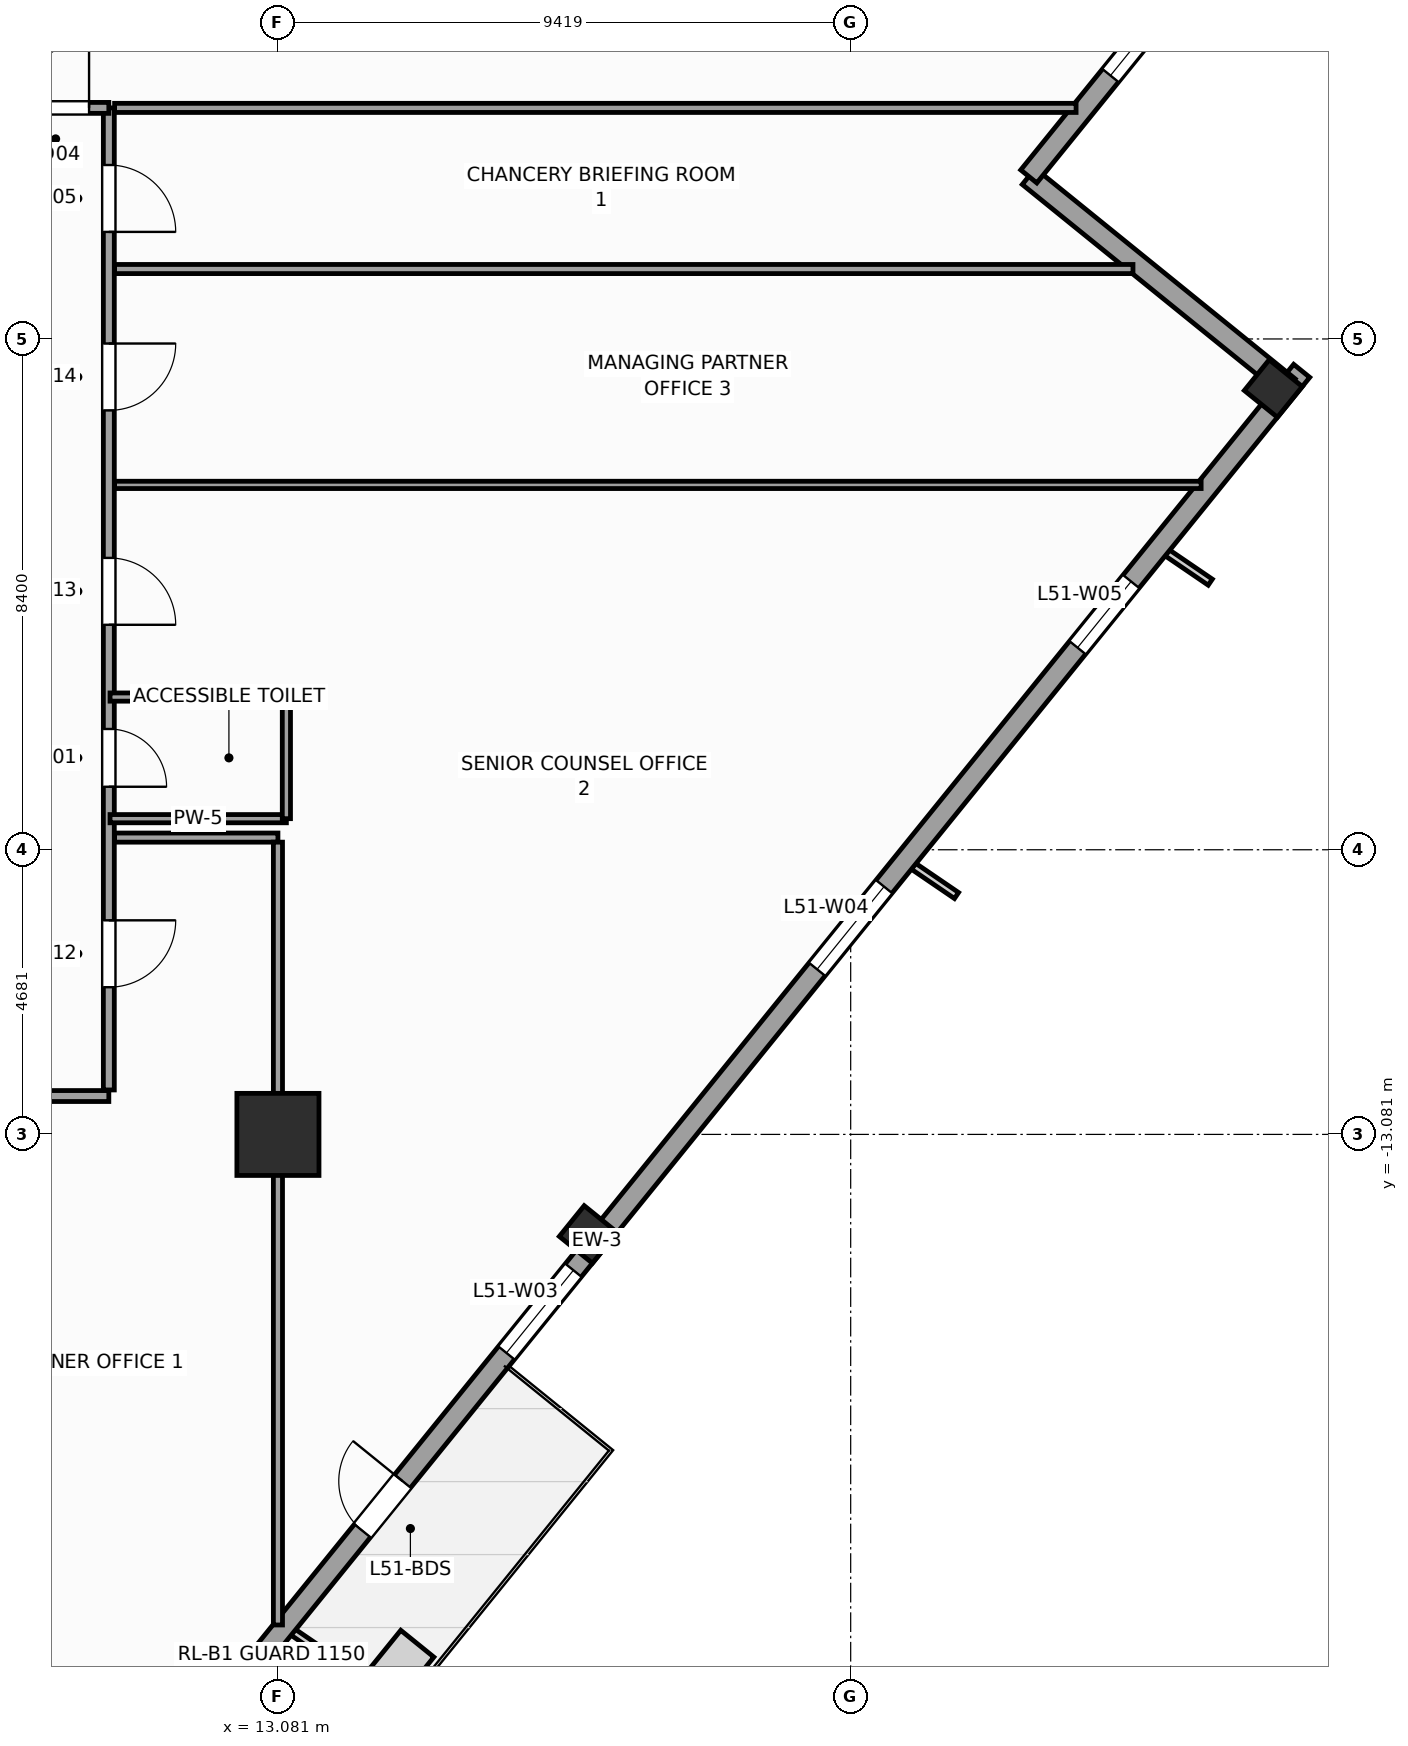
"""IFC4 building model, lengths in metres.
Left out: names, types, materials, properties, quantities, classifications, styles, units other than length and angle.
Written with IfcOpenShell. Run it as: python <this file> out.ifc"""

import sys

from ifc_helpers import new_model, si_unit, direction, frame, frame_2d, origin, origin_2d, place, context, subcontext, project, spatial, rectangle, extrude, source, transform, mapped, element, fill, save


model = new_model("IFC4")
c1 = context("Model", 3, precision=1e-05, world=origin(), true_north=direction((0.0, 1.0)))
c2 = subcontext(c1, "Body", "Model", "MODEL_VIEW")
j1 = project(units=[si_unit("LENGTHUNIT", "METRE"), si_unit("PLANEANGLEUNIT", "RADIAN")], contexts=[c1])
p1 = place(None, origin())
s1 = spatial("IfcSite", under=j1, at=p1, CompositionType="ELEMENT")
p2 = place(p1, origin())
s2 = spatial("IfcBuilding", under=s1, at=p2, CompositionType="ELEMENT")
p3 = place(p2, frame((0.0, 0.0, 213.4)))
s3 = spatial("IfcBuildingStorey", under=s2, at=p3, CompositionType="ELEMENT", Elevation=213.4)
m1 = source(origin(), c2, "Body", "SweptSolid", [
    extrude(rectangle(XDim=1.35, YDim=1.35, at=origin_2d()), origin(), (0.0, 0.0, 1.0), 3.9),
])
p4 = place(p3, frame((13.081, -13.081, 0.0), z_axis=(0.0, 0.0, 1.0), x_axis=(1.0, 0.0, 0.0)))
e1 = element("IfcColumn", 1, at=p4, inside=s3, PredefinedType="COLUMN", context=c2, shape_type="MappedRepresentation", body=[
    mapped(m1, transform((0.0, 0.0, 0.0), scale=1.0)),
])
m2 = source(origin(), c2, "Body", "SweptSolid", [
    extrude(rectangle(XDim=0.65, YDim=0.7, at=origin_2d()), origin(), (0.0, 0.0, 1.0), 3.9),
])
for number, where, z_axis, x_axis in (
    (2, (18.185, -14.726, 0.0), (0.0, 0.0, 1.0), (0.629, 0.777, 0.0)),
    (3, (29.45, -0.815, 0.0), (0.0, 0.0, 1.0), (0.629, 0.777, 0.0)),
):
    element("IfcColumn", number, at=place(p3, frame(where, z_axis=z_axis, x_axis=x_axis)), inside=s3, PredefinedType="COLUMN", context=c2, shape_type="MappedRepresentation", body=[
        mapped(m2, transform((0.0, 0.0, 0.0), scale=1.0)),
    ])
p5 = place(p3, frame((6.733, -29.154, 0.0), z_axis=(0.0, 0.0, 1.0), x_axis=(0.629325378072, 0.77714192302, 0.0)))
e4 = element("IfcWall", 4, at=p5, inside=s3, PredefinedType="STANDARD", context=c2, shape_type="SweptSolid", body=[
    extrude(rectangle(XDim=36.84, YDim=0.34, at=frame_2d((18.42, 0.0))), origin(), (0.0, 0.0, 1.0), 2.96),
])
p6 = place(p5, frame((12.295, 0.0, 0.0)))
e5 = element("IfcOpeningElement", 5, at=p6, cuts=e4, PredefinedType="OPENING", context=c2, shape_type="SweptSolid", body=[
    extrude(rectangle(XDim=1.05, YDim=2.25, at=frame_2d((0.525, 1.125))), frame((0.0, 0.18, 0.0), z_axis=(0.0, -1.0, 0.0), x_axis=(1.0, 0.0, 0.0)), (0.0, 0.0, 1.0), 0.36),
])
p7 = place(p5, frame((3.721, 0.0, 0.48)))
e6 = element("IfcOpeningElement", 6, at=p7, cuts=e4, PredefinedType="OPENING", context=c2, shape_type="SweptSolid", body=[
    extrude(rectangle(XDim=1.4, YDim=2.4, at=frame_2d((0.7, 1.2))), frame((0.0, 0.18, 0.0), z_axis=(0.0, -1.0, 0.0), x_axis=(1.0, 0.0, 0.0)), (0.0, 0.0, 1.0), 0.36),
])
p8 = place(p5, frame((7.559, 0.0, 0.58)))
e7 = element("IfcOpeningElement", 7, at=p8, cuts=e4, PredefinedType="OPENING", context=c2, shape_type="SweptSolid", body=[
    extrude(rectangle(XDim=1.75, YDim=2.3, at=frame_2d((0.875, 1.15))), frame((0.0, 0.18, 0.0), z_axis=(0.0, -1.0, 0.0), x_axis=(1.0, 0.0, 0.0)), (0.0, 0.0, 1.0), 0.36),
])
p9 = place(p5, frame((16.058, 0.0, 0.58)))
e8 = element("IfcOpeningElement", 8, at=p9, cuts=e4, PredefinedType="OPENING", context=c2, shape_type="SweptSolid", body=[
    extrude(rectangle(XDim=1.75, YDim=2.3, at=frame_2d((0.875, 1.15))), frame((0.0, 0.18, 0.0), z_axis=(0.0, -1.0, 0.0), x_axis=(1.0, 0.0, 0.0)), (0.0, 0.0, 1.0), 0.36),
])
p10 = place(p5, frame((24.176, 0.0, 0.58)))
e9 = element("IfcOpeningElement", 9, at=p10, cuts=e4, PredefinedType="OPENING", context=c2, shape_type="SweptSolid", body=[
    extrude(rectangle(XDim=1.75, YDim=2.3, at=frame_2d((0.875, 1.15))), frame((0.0, 0.18, 0.0), z_axis=(0.0, -1.0, 0.0), x_axis=(1.0, 0.0, 0.0)), (0.0, 0.0, 1.0), 0.36),
])
p11 = place(p5, frame((30.982, 0.0, 0.48)))
e10 = element("IfcOpeningElement", 10, at=p11, cuts=e4, PredefinedType="OPENING", context=c2, shape_type="SweptSolid", body=[
    extrude(rectangle(XDim=1.4, YDim=2.4, at=frame_2d((0.7, 1.2))), frame((0.0, 0.18, 0.0), z_axis=(0.0, -1.0, 0.0), x_axis=(1.0, 0.0, 0.0)), (0.0, 0.0, 1.0), 0.36),
])
p12 = place(p3, frame((29.703, -0.789, 0.0), z_axis=(0.0, 0.0, 1.0), x_axis=(-0.77714355312, 0.629323365087, 0.0)))
e11 = element("IfcWall", 11, at=p12, inside=s3, PredefinedType="STANDARD", context=c2, shape_type="SweptSolid", body=[
    extrude(rectangle(XDim=5.5, YDim=0.34, at=frame_2d((2.75, 0.0))), origin(), (0.0, 0.0, 1.0), 3.66),
])
p13 = place(p3, frame((25.429, 2.673, 0.0), z_axis=(0.0, 0.0, 1.0), x_axis=(0.629299794138, 0.777162640055, 0.0)))
e12 = element("IfcWall", 12, at=p13, inside=s3, PredefinedType="STANDARD", context=c2, shape_type="SweptSolid", body=[
    extrude(rectangle(XDim=5.67, YDim=0.34, at=frame_2d((2.835, 0.0))), origin(), (0.0, 0.0, 1.0), 3.66),
])
p14 = place(p13, frame((2.135, 0.0, 0.48)))
e13 = element("IfcOpeningElement", 13, at=p14, cuts=e12, PredefinedType="OPENING", context=c2, shape_type="SweptSolid", body=[
    extrude(rectangle(XDim=1.4, YDim=2.4, at=frame_2d((0.7, 1.2))), frame((0.0, 0.18, 0.0), z_axis=(0.0, -1.0, 0.0), x_axis=(1.0, 0.0, 0.0)), (0.0, 0.0, 1.0), 0.36),
])
p15 = place(p3, frame((-11.45, -12.45, 0.0), z_axis=(0.0, 0.0, 1.0), x_axis=(1.0, 0.0, 0.0)))
e14 = element("IfcWall", 14, at=p15, inside=s3, PredefinedType="PARTITIONING", context=c2, shape_type="SweptSolid", body=[
    extrude(rectangle(XDim=21.75, YDim=0.18, at=frame_2d((10.875, 0.0))), origin(), (0.0, 0.0, 1.0), 3.66),
])
p16 = place(p15, frame((5.411, 0.0, 0.0)))
e15 = element("IfcOpeningElement", 15, at=p16, cuts=e14, PredefinedType="OPENING", context=c2, shape_type="SweptSolid", body=[
    extrude(rectangle(XDim=0.95, YDim=2.1, at=frame_2d((0.475, 1.05))), frame((0.0, 0.1, 0.0), z_axis=(0.0, -1.0, 0.0), x_axis=(1.0, 0.0, 0.0)), (0.0, 0.0, 1.0), 0.2),
])
p17 = place(p15, frame((1.839, 0.0, 0.0)))
e16 = element("IfcOpeningElement", 16, at=p17, cuts=e14, PredefinedType="OPENING", context=c2, shape_type="SweptSolid", body=[
    extrude(rectangle(XDim=1.1, YDim=2.2, at=frame_2d((0.55, 1.1))), frame((0.0, 0.1, 0.0), z_axis=(0.0, -1.0, 0.0), x_axis=(1.0, 0.0, 0.0)), (0.0, 0.0, 1.0), 0.2),
])
p18 = place(p15, frame((7.574, 0.0, 0.0)))
e17 = element("IfcOpeningElement", 17, at=p18, cuts=e14, PredefinedType="OPENING", context=c2, shape_type="SweptSolid", body=[
    extrude(rectangle(XDim=1.1, YDim=2.2, at=frame_2d((0.55, 1.1))), frame((0.0, 0.1, 0.0), z_axis=(0.0, -1.0, 0.0), x_axis=(1.0, 0.0, 0.0)), (0.0, 0.0, 1.0), 0.2),
])
p19 = place(p15, frame((11.05, 0.0, 0.0)))
e18 = element("IfcOpeningElement", 18, at=p19, cuts=e14, PredefinedType="OPENING", context=c2, shape_type="SweptSolid", body=[
    extrude(rectangle(XDim=1.1, YDim=2.2, at=frame_2d((0.55, 1.1))), frame((0.0, 0.1, 0.0), z_axis=(0.0, -1.0, 0.0), x_axis=(1.0, 0.0, 0.0)), (0.0, 0.0, 1.0), 0.2),
])
p20 = place(p15, frame((15.65, 0.0, 0.0)))
e19 = element("IfcOpeningElement", 19, at=p20, cuts=e14, PredefinedType="OPENING", context=c2, shape_type="SweptSolid", body=[
    extrude(rectangle(XDim=1.1, YDim=2.2, at=frame_2d((0.55, 1.1))), frame((0.0, 0.1, 0.0), z_axis=(0.0, -1.0, 0.0), x_axis=(1.0, 0.0, 0.0)), (0.0, 0.0, 1.0), 0.2),
])
p21 = place(p3, frame((10.3, -12.35, 0.0), z_axis=(0.0, 0.0, 1.0), x_axis=(0.0, 1.0, 0.0)))
e20 = element("IfcWall", 20, at=p21, inside=s3, PredefinedType="PARTITIONING", context=c2, shape_type="SweptSolid", body=[
    extrude(rectangle(XDim=16.15, YDim=0.18, at=frame_2d((8.075, 0.0))), origin(), (0.0, 0.0, 1.0), 3.66),
])
p22 = place(p21, frame((4.986, 0.0, 0.0)))
e21 = element("IfcOpeningElement", 21, at=p22, cuts=e20, PredefinedType="OPENING", context=c2, shape_type="SweptSolid", body=[
    extrude(rectangle(XDim=0.95, YDim=2.1, at=frame_2d((0.475, 1.05))), frame((0.0, 0.1, 0.0), z_axis=(0.0, -1.0, 0.0), x_axis=(1.0, 0.0, 0.0)), (0.0, 0.0, 1.0), 0.2),
])
p23 = place(p21, frame((14.111, 0.0, 0.0)))
e22 = element("IfcOpeningElement", 22, at=p23, cuts=e20, PredefinedType="OPENING", context=c2, shape_type="SweptSolid", body=[
    extrude(rectangle(XDim=1.1, YDim=2.2, at=frame_2d((0.55, 1.1))), frame((0.0, 0.1, 0.0), z_axis=(0.0, -1.0, 0.0), x_axis=(1.0, 0.0, 0.0)), (0.0, 0.0, 1.0), 0.2),
])
p24 = place(p21, frame((1.689, 0.0, 0.0)))
e23 = element("IfcOpeningElement", 23, at=p24, cuts=e20, PredefinedType="OPENING", context=c2, shape_type="SweptSolid", body=[
    extrude(rectangle(XDim=1.1, YDim=2.2, at=frame_2d((0.55, 1.1))), frame((0.0, 0.1, 0.0), z_axis=(0.0, -1.0, 0.0), x_axis=(1.0, 0.0, 0.0)), (0.0, 0.0, 1.0), 0.2),
])
p25 = place(p21, frame((7.65, 0.0, 0.0)))
e24 = element("IfcOpeningElement", 24, at=p25, cuts=e20, PredefinedType="OPENING", context=c2, shape_type="SweptSolid", body=[
    extrude(rectangle(XDim=1.1, YDim=2.2, at=frame_2d((0.55, 1.1))), frame((0.0, 0.1, 0.0), z_axis=(0.0, -1.0, 0.0), x_axis=(1.0, 0.0, 0.0)), (0.0, 0.0, 1.0), 0.2),
])
p26 = place(p21, frame((11.175, 0.0, 0.0)))
e25 = element("IfcOpeningElement", 25, at=p26, cuts=e20, PredefinedType="OPENING", context=c2, shape_type="SweptSolid", body=[
    extrude(rectangle(XDim=1.1, YDim=2.2, at=frame_2d((0.55, 1.1))), frame((0.0, 0.1, 0.0), z_axis=(0.0, -1.0, 0.0), x_axis=(1.0, 0.0, 0.0)), (0.0, 0.0, 1.0), 0.2),
])
p27 = place(p3, frame((8.55, 3.8, 0.0), z_axis=(0.0, 0.0, 1.0), x_axis=(1.0, 0.0, 0.0)))
e26 = element("IfcWall", 26, at=p27, inside=s3, PredefinedType="PARTITIONING", context=c2, shape_type="SweptSolid", body=[
    extrude(rectangle(XDim=1.75, YDim=0.18, at=frame_2d((0.875, 0.0))), origin(), (0.0, 0.0, 1.0), 3.66),
])
p28 = place(p27, frame((0.325, 0.0, 0.0)))
e27 = element("IfcOpeningElement", 27, at=p28, cuts=e26, PredefinedType="OPENING", context=c2, shape_type="SweptSolid", body=[
    extrude(rectangle(XDim=1.1, YDim=2.2, at=frame_2d((0.55, 1.1))), frame((0.0, 0.1, 0.0), z_axis=(0.0, -1.0, 0.0), x_axis=(1.0, 0.0, 0.0)), (0.0, 0.0, 1.0), 0.2),
])
p29 = place(p3, frame((10.395, 1.15, 0.0), z_axis=(0.0, 0.0, 1.0), x_axis=(1.0, 0.0, 0.0)))
e28 = element("IfcWall", 28, at=p29, inside=s3, PredefinedType="PARTITIONING", context=c2, shape_type="SweptSolid", body=[
    extrude(rectangle(XDim=16.747, YDim=0.15, at=frame_2d((8.374, 0.0))), origin(), (0.0, 0.0, 1.0), 3.66),
])
p30 = place(p3, frame((10.395, 3.8, 0.0), z_axis=(0.0, 0.0, 1.0), x_axis=(1.0, 0.0, 0.0)))
e29 = element("IfcWall", 29, at=p30, inside=s3, PredefinedType="PARTITIONING", context=c2, shape_type="SweptSolid", body=[
    extrude(rectangle(XDim=15.812, YDim=0.15, at=frame_2d((7.906, 0.0))), origin(), (0.0, 0.0, 1.0), 3.66),
])
p31 = place(p3, frame((10.395, -8.2, 0.0), z_axis=(0.0, 0.0, 1.0), x_axis=(1.0, 0.0, 0.0)))
e30 = element("IfcWall", 30, at=p31, inside=s3, PredefinedType="PARTITIONING", context=c2, shape_type="SweptSolid", body=[
    extrude(rectangle(XDim=2.686, YDim=0.15, at=frame_2d((1.343, 0.0))), origin(), (0.0, 0.0, 1.0), 3.66),
])
p32 = place(p3, frame((13.081, -8.275, 0.0), z_axis=(0.0, 0.0, 1.0), x_axis=(0.0, -1.0, 0.0)))
e31 = element("IfcWall", 31, at=p32, inside=s3, PredefinedType="PARTITIONING", context=c2, shape_type="SweptSolid", body=[
    extrude(rectangle(XDim=12.874, YDim=0.15, at=frame_2d((6.437, 0.0))), origin(), (0.0, 0.0, 1.0), 2.76),
])
p33 = place(p3, frame((10.395, -2.4, 0.0), z_axis=(0.0, 0.0, 1.0), x_axis=(1.0, 0.0, 0.0)))
e32 = element("IfcWall", 32, at=p33, inside=s3, PredefinedType="PARTITIONING", context=c2, shape_type="SweptSolid", body=[
    extrude(rectangle(XDim=17.868, YDim=0.12, at=frame_2d((8.934, 0.0))), origin(), (0.0, 0.0, 1.0), 3.66),
])
p34 = place(p3, frame((10.32, -7.889, 0.0), z_axis=(0.0, 0.0, 1.0), x_axis=(1.0, 0.0, 0.0)))
e33 = element("IfcWall", 33, at=p34, inside=s3, PredefinedType="PARTITIONING", context=c2, shape_type="SweptSolid", body=[
    extrude(rectangle(XDim=2.9, YDim=0.135, at=frame_2d((1.45, 0.0))), origin(), (0.0, 0.0, 1.0), 3.66),
])
p35 = place(p3, frame((13.22, -7.889, 0.0), z_axis=(0.0, 0.0, 1.0), x_axis=(0.0, 1.0, 0.0)))
e34 = element("IfcWall", 34, at=p35, inside=s3, PredefinedType="PARTITIONING", context=c2, shape_type="SweptSolid", body=[
    extrude(rectangle(XDim=2.0, YDim=0.135, at=frame_2d((1.0, 0.0))), origin(), (0.0, 0.0, 1.0), 2.76),
])
p36 = place(p3, frame((10.32, -5.889, 0.0), z_axis=(0.0, 0.0, 1.0), x_axis=(1.0, 0.0, 0.0)))
e35 = element("IfcWall", 35, at=p36, inside=s3, PredefinedType="PARTITIONING", context=c2, shape_type="SweptSolid", body=[
    extrude(rectangle(XDim=2.9, YDim=0.135, at=frame_2d((1.45, 0.0))), origin(), (0.0, 0.0, 1.0), 3.66),
])
m3 = source(origin(), c2, "Body", "SweptSolid", [
    extrude(rectangle(XDim=1.05, YDim=2.25, at=frame_2d((0.525, 1.125))), frame((0.0, 0.025, 0.0), z_axis=(0.0, -1.0, 0.0), x_axis=(1.0, 0.0, 0.0)), (0.0, 0.0, 1.0), 0.05),
])
p37 = place(p6, origin())
e36 = element("IfcDoor", 36, at=p37, inside=s3, OperationType="SINGLE_SWING_RIGHT", PredefinedType="DOOR", context=c2, shape_type="MappedRepresentation", body=[
    mapped(m3, transform((0.0, 0.0, 0.0), scale=1.0)),
])
fill(e5, e36)
m4 = source(origin(), c2, "Body", "SweptSolid", [
    extrude(rectangle(XDim=1.75, YDim=2.3, at=frame_2d((0.875, 1.15))), frame((0.0, 0.03, 0.0), z_axis=(0.0, -1.0, 0.0), x_axis=(1.0, 0.0, 0.0)), (0.0, 0.0, 1.0), 0.06),
])
p38 = place(p9, origin())
e37 = element("IfcWindow", 37, at=p38, inside=s3, PartitioningType="SINGLE_PANEL", PredefinedType="WINDOW", context=c2, shape_type="MappedRepresentation", body=[
    mapped(m4, transform((0.0, 0.0, 0.0), scale=1.0)),
])
fill(e8, e37)
p39 = place(p10, origin())
e38 = element("IfcWindow", 38, at=p39, inside=s3, PartitioningType="SINGLE_PANEL", PredefinedType="WINDOW", context=c2, shape_type="MappedRepresentation", body=[
    mapped(m4, transform((0.0, 0.0, 0.0), scale=1.0)),
])
fill(e9, e38)
m5 = source(origin(), c2, "Body", "SweptSolid", [
    extrude(rectangle(XDim=1.4, YDim=2.4, at=frame_2d((0.7, 1.2))), frame((0.0, 0.03, 0.0), z_axis=(0.0, -1.0, 0.0), x_axis=(1.0, 0.0, 0.0)), (0.0, 0.0, 1.0), 0.06),
])
p40 = place(p11, origin())
e39 = element("IfcWindow", 39, at=p40, inside=s3, PartitioningType="SINGLE_PANEL", PredefinedType="WINDOW", context=c2, shape_type="MappedRepresentation", body=[
    mapped(m5, transform((0.0, 0.0, 0.0), scale=1.0)),
])
fill(e10, e39)
p41 = place(p14, origin())
e40 = element("IfcWindow", 40, at=p41, inside=s3, PartitioningType="SINGLE_PANEL", PredefinedType="WINDOW", context=c2, shape_type="MappedRepresentation", body=[
    mapped(m5, transform((0.0, 0.0, 0.0), scale=1.0)),
])
fill(e13, e40)
m6 = source(origin(), c2, "Body", "SweptSolid", [
    extrude(rectangle(XDim=0.95, YDim=2.1, at=frame_2d((0.475, 1.05))), frame((0.0, 0.025, 0.0), z_axis=(0.0, -1.0, 0.0), x_axis=(1.0, 0.0, 0.0)), (0.0, 0.0, 1.0), 0.05),
])
p42 = place(p22, frame((0.95, 0.0, 0.0), z_axis=(0.0, 0.0, 1.0), x_axis=(-1.0, 0.0, 0.0)))
e41 = element("IfcDoor", 41, at=p42, inside=s3, OperationType="SINGLE_SWING_LEFT", PredefinedType="DOOR", context=c2, shape_type="MappedRepresentation", body=[
    mapped(m6, transform((0.0, 0.0, 0.0), scale=1.0)),
])
fill(e21, e41)
m7 = source(origin(), c2, "Body", "SweptSolid", [
    extrude(rectangle(XDim=1.1, YDim=2.2, at=frame_2d((0.55, 1.1))), frame((0.0, 0.025, 0.0), z_axis=(0.0, -1.0, 0.0), x_axis=(1.0, 0.0, 0.0)), (0.0, 0.0, 1.0), 0.05),
])
p43 = place(p28, origin())
e42 = element("IfcDoor", 42, at=p43, inside=s3, OperationType="SINGLE_SWING_RIGHT", PredefinedType="DOOR", context=c2, shape_type="MappedRepresentation", body=[
    mapped(m7, transform((0.0, 0.0, 0.0), scale=1.0)),
])
fill(e27, e42)
p44 = place(p23, frame((1.1, 0.0, 0.0), z_axis=(0.0, 0.0, 1.0), x_axis=(-1.0, 0.0, 0.0)))
e43 = element("IfcDoor", 43, at=p44, inside=s3, OperationType="SINGLE_SWING_LEFT", PredefinedType="DOOR", context=c2, shape_type="MappedRepresentation", body=[
    mapped(m7, transform((0.0, 0.0, 0.0), scale=1.0)),
])
fill(e22, e43)
p45 = place(p24, frame((1.1, 0.0, 0.0), z_axis=(0.0, 0.0, 1.0), x_axis=(-1.0, 0.0, 0.0)))
e44 = element("IfcDoor", 44, at=p45, inside=s3, OperationType="SINGLE_SWING_RIGHT", PredefinedType="DOOR", context=c2, shape_type="MappedRepresentation", body=[
    mapped(m7, transform((0.0, 0.0, 0.0), scale=1.0)),
])
fill(e23, e44)
p46 = place(p25, frame((1.1, 0.0, 0.0), z_axis=(0.0, 0.0, 1.0), x_axis=(-1.0, 0.0, 0.0)))
e45 = element("IfcDoor", 45, at=p46, inside=s3, OperationType="SINGLE_SWING_LEFT", PredefinedType="DOOR", context=c2, shape_type="MappedRepresentation", body=[
    mapped(m7, transform((0.0, 0.0, 0.0), scale=1.0)),
])
fill(e24, e45)
p47 = place(p26, frame((1.1, 0.0, 0.0), z_axis=(0.0, 0.0, 1.0), x_axis=(-1.0, 0.0, 0.0)))
e46 = element("IfcDoor", 46, at=p47, inside=s3, OperationType="SINGLE_SWING_RIGHT", PredefinedType="DOOR", context=c2, shape_type="MappedRepresentation", body=[
    mapped(m7, transform((0.0, 0.0, 0.0), scale=1.0)),
])
fill(e25, e46)
save(model, sys.argv[1])
